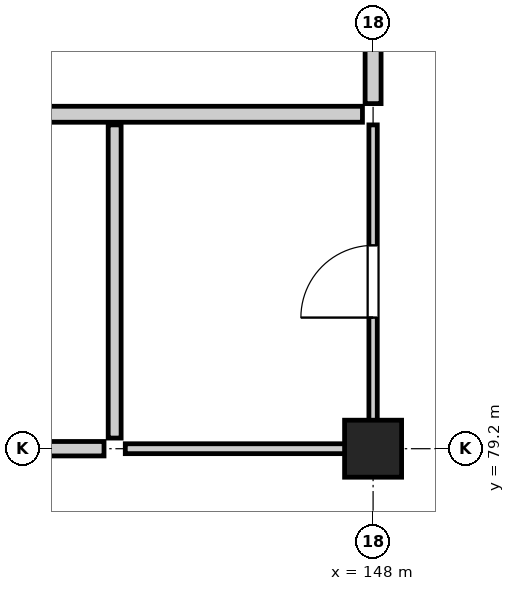
"""IFC4 building model, lengths in metres.
Left out: names, types, materials, properties, quantities, classifications, styles, units other than length and angle.
Written with IfcOpenShell. Run it as: python <this file> out.ifc"""

import sys

from ifc_helpers import new_model, si_unit, direction, frame, frame_2d, origin, origin_2d, place, context, subcontext, project, spatial, rectangle, extrude, element, fill, save


model = new_model("IFC4")
c1 = context("Model", 3, precision=1e-05, world=origin(), true_north=direction((0.0, 1.0)))
c2 = subcontext(c1, "Body", "Model", "MODEL_VIEW")
j1 = project(units=[si_unit("LENGTHUNIT", "METRE"), si_unit("PLANEANGLEUNIT", "RADIAN")], contexts=[c1])
p1 = place(None, origin())
s1 = spatial("IfcSite", under=j1, at=p1, CompositionType="ELEMENT")
p2 = place(p1, origin())
s2 = spatial("IfcBuilding", under=s1, at=p2, CompositionType="ELEMENT")
p3 = place(p2, frame((0.0, 0.0, 27.8)))
s3 = spatial("IfcBuildingStorey", under=s2, at=p3, CompositionType="ELEMENT", Elevation=27.8)
p4 = place(p3, frame((148.0, 79.2, 0.0), z_axis=(0.0, 0.0, 1.0), x_axis=(1.0, 0.0, 0.0)))
e1 = element("IfcColumn", 1, at=p4, inside=s3, PredefinedType="COLUMN", context=c2, shape_type="SweptSolid", body=[
    extrude(rectangle(XDim=0.75, YDim=0.75, at=origin_2d()), origin(), (0.0, 0.0, 1.0), 3.9),
])
p5 = place(p3, frame((140.14, 83.6, 0.0), z_axis=(0.0, 0.0, 1.0), x_axis=(1.0, 0.0, 0.0)))
e2 = element("IfcWall", 2, at=p5, inside=s3, PredefinedType="SOLIDWALL", context=c2, shape_type="SweptSolid", body=[
    extrude(rectangle(XDim=7.72, YDim=0.21, at=frame_2d((3.86, 0.0))), origin(), (0.0, 0.0, 1.0), 3.62),
])
p6 = place(p3, frame((148.0, 83.74, 0.0), z_axis=(0.0, 0.0, 1.0), x_axis=(0.0, 1.0, 0.0)))
e3 = element("IfcWall", 3, at=p6, inside=s3, PredefinedType="SOLIDWALL", context=c2, shape_type="SweptSolid", body=[
    extrude(rectangle(XDim=3.32, YDim=0.21, at=frame_2d((1.66, 0.0))), origin(), (0.0, 0.0, 1.0), 2.985),
])
p7 = place(p6, frame((1.16, 0.0, 0.0)))
e4 = element("IfcOpeningElement", 4, at=p7, cuts=e3, PredefinedType="OPENING", context=c2, shape_type="SweptSolid", body=[
    extrude(rectangle(XDim=1.0, YDim=2.15, at=frame_2d((0.5, 1.075))), frame((0.0, 0.117, 0.0), z_axis=(0.0, -1.0, 0.0), x_axis=(1.0, 0.0, 0.0)), (0.0, 0.0, 1.0), 0.234),
])
p8 = place(p3, frame((140.14, 79.2, 0.0), z_axis=(0.0, 0.0, 1.0), x_axis=(1.0, 0.0, 0.0)))
e5 = element("IfcWall", 5, at=p8, inside=s3, PredefinedType="PARTITIONING", context=c2, shape_type="SweptSolid", body=[
    extrude(rectangle(XDim=4.32, YDim=0.19, at=frame_2d((2.16, 0.0))), origin(), (0.0, 0.0, 1.0), 3.135),
])
p9 = place(p8, frame((1.66, 0.0, 0.0)))
e6 = element("IfcOpeningElement", 6, at=p9, cuts=e5, PredefinedType="OPENING", context=c2, shape_type="SweptSolid", body=[
    extrude(rectangle(XDim=1.0, YDim=2.15, at=frame_2d((0.5, 1.075))), frame((0.0, 0.107, 0.0), z_axis=(0.0, -1.0, 0.0), x_axis=(1.0, 0.0, 0.0)), (0.0, 0.0, 1.0), 0.214),
])
p10 = place(p3, frame((144.6, 79.34, 0.0), z_axis=(0.0, 0.0, 1.0), x_axis=(0.0, 1.0, 0.0)))
e7 = element("IfcWall", 7, at=p10, inside=s3, PredefinedType="PARTITIONING", context=c2, shape_type="SweptSolid", body=[
    extrude(rectangle(XDim=4.12, YDim=0.17, at=frame_2d((2.06, 0.0))), origin(), (0.0, 0.0, 1.0), 3.62),
])
p11 = place(p3, frame((144.74, 79.2, 0.0), z_axis=(0.0, 0.0, 1.0), x_axis=(1.0, 0.0, 0.0)))
e8 = element("IfcWall", 8, at=p11, inside=s3, PredefinedType="PARTITIONING", context=c2, shape_type="SweptSolid", body=[
    extrude(rectangle(XDim=3.12, YDim=0.13, at=frame_2d((1.56, 0.0))), origin(), (0.0, 0.0, 1.0), 3.135),
])
p12 = place(p3, frame((148.0, 79.34, 0.0), z_axis=(0.0, 0.0, 1.0), x_axis=(0.0, 1.0, 0.0)))
e9 = element("IfcWall", 9, at=p12, inside=s3, PredefinedType="PARTITIONING", context=c2, shape_type="SweptSolid", body=[
    extrude(rectangle(XDim=4.12, YDim=0.11, at=frame_2d((2.06, 0.0))), origin(), (0.0, 0.0, 1.0), 2.985),
])
p13 = place(p12, frame((1.585, 0.0, 0.0)))
e10 = element("IfcOpeningElement", 10, at=p13, cuts=e9, PredefinedType="OPENING", context=c2, shape_type="SweptSolid", body=[
    extrude(rectangle(XDim=0.95, YDim=2.15, at=frame_2d((0.475, 1.075))), frame((0.0, 0.067, 0.0), z_axis=(0.0, -1.0, 0.0), x_axis=(1.0, 0.0, 0.0)), (0.0, 0.0, 1.0), 0.134),
])
p14 = place(p13, origin())
e11 = element("IfcDoor", 11, at=p14, inside=s3, OperationType="SINGLE_SWING_LEFT", PredefinedType="DOOR", context=c2, shape_type="SweptSolid", body=[
    extrude(rectangle(XDim=0.95, YDim=2.15, at=frame_2d((0.475, 1.075))), frame((0.0, 0.025, 0.0), z_axis=(0.0, -1.0, 0.0), x_axis=(1.0, 0.0, 0.0)), (0.0, 0.0, 1.0), 0.05),
])
fill(e10, e11)
save(model, sys.argv[1])
